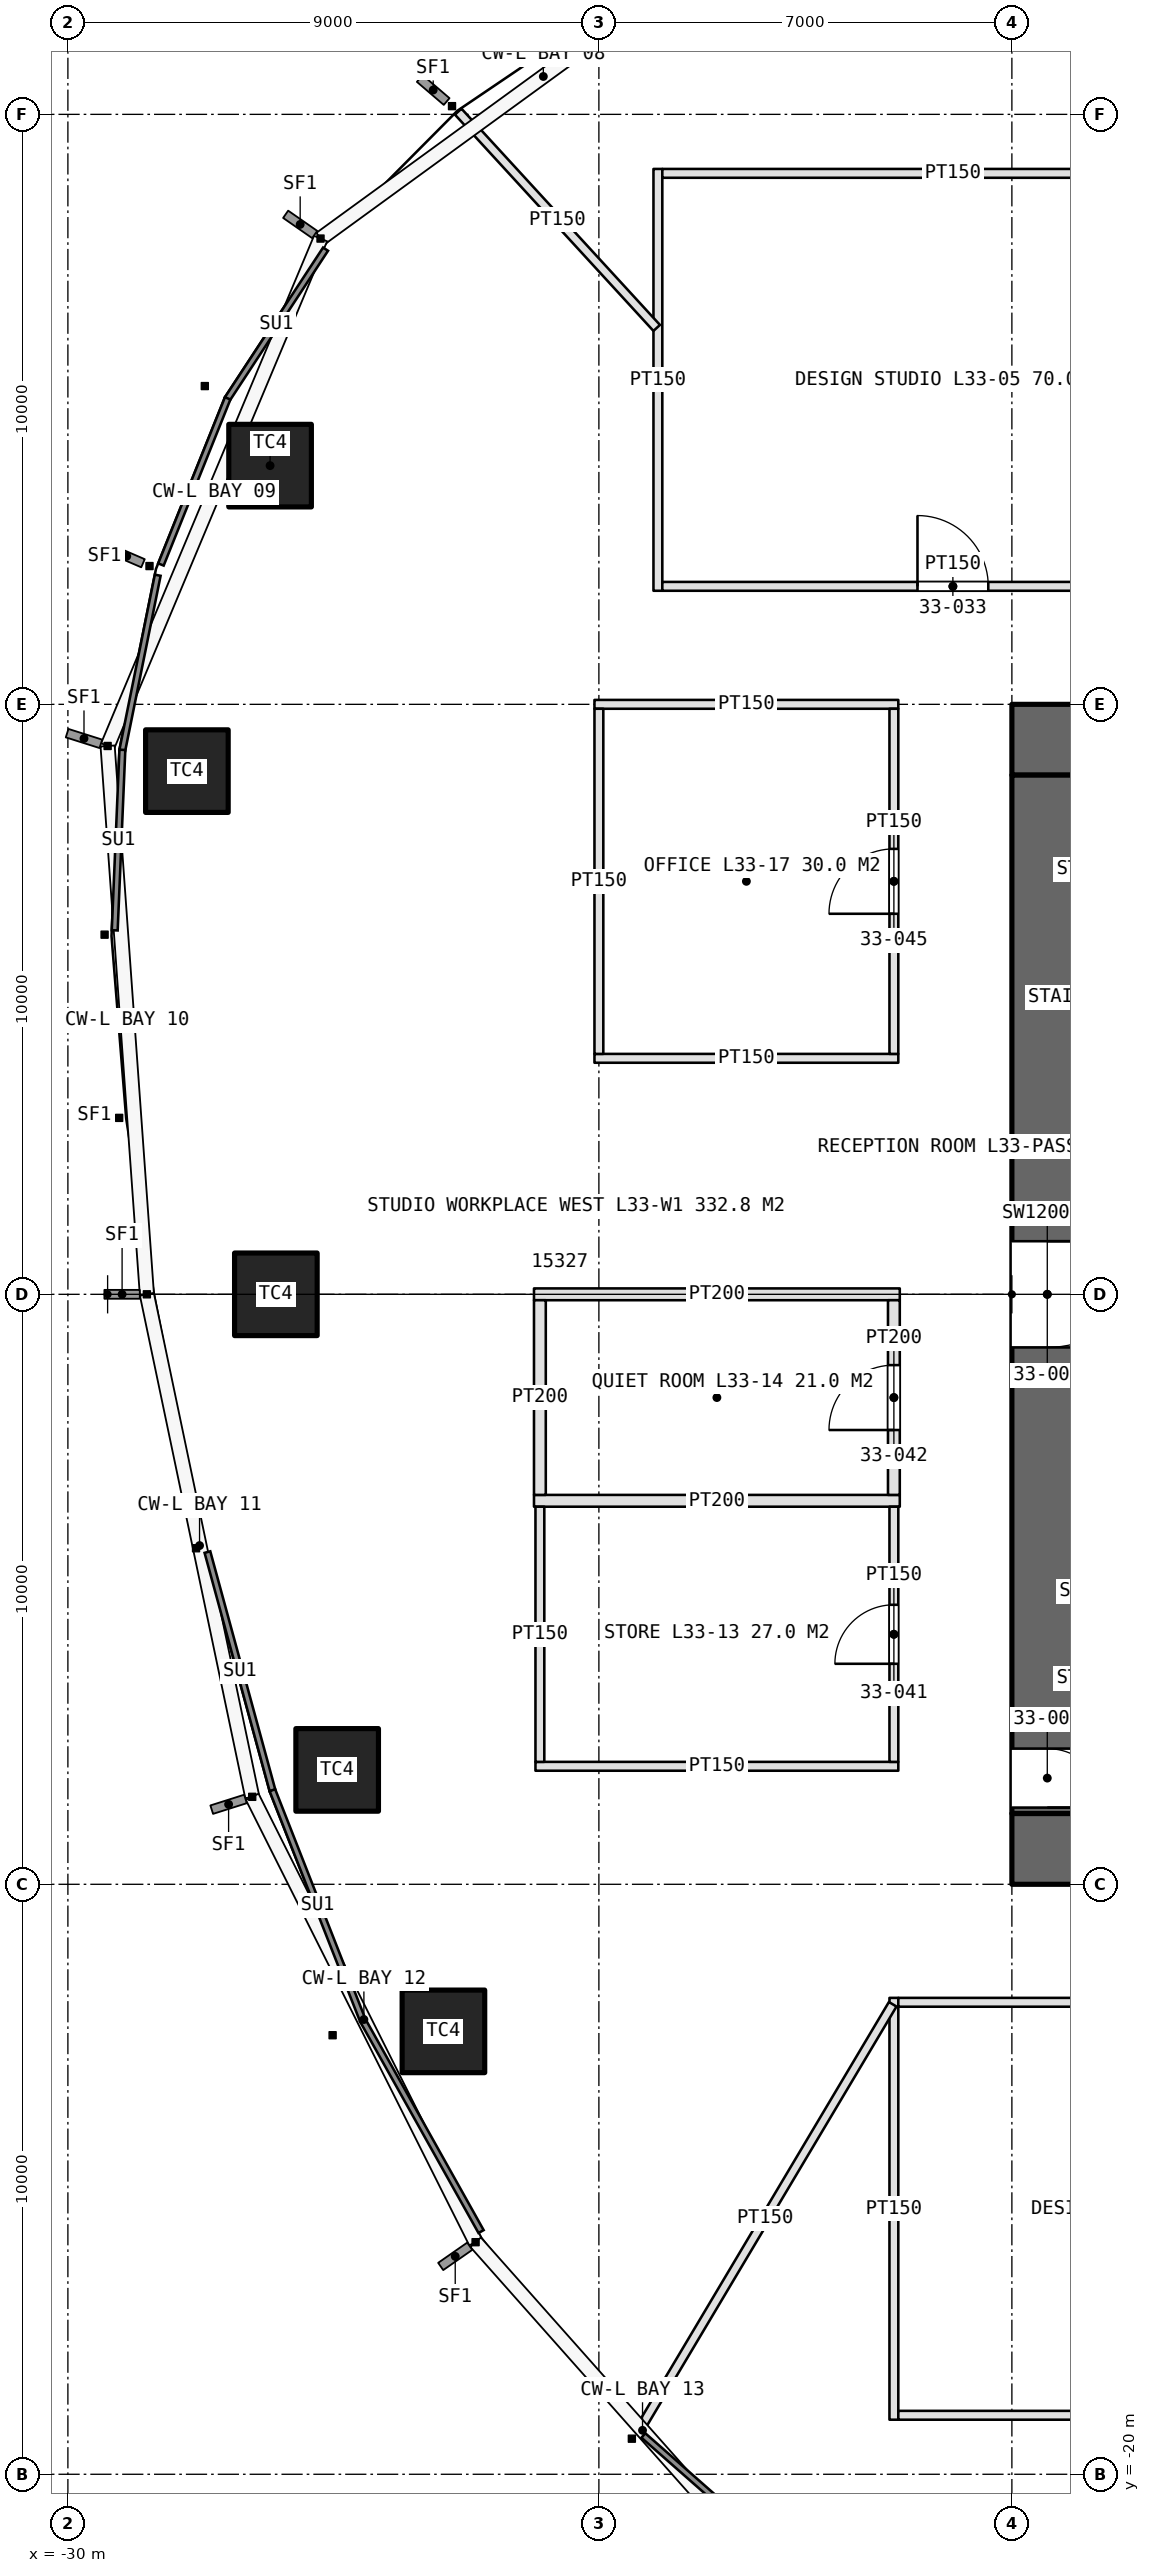
"""IFC4 building model, lengths in metres.
Left out: names, types, materials, properties, quantities, classifications, styles, units other than length and angle.
Written with IfcOpenShell. Run it as: python <this file> out.ifc"""

import sys

from ifc_helpers import new_model, si_unit, direction, frame, frame_2d, origin, origin_2d, place, context, subcontext, project, spatial, rectangle, extrude, element, fill, save


model = new_model("IFC4")
c1 = context("Model", 3, precision=1e-05, world=origin(), true_north=direction((0.0, 1.0)))
c2 = subcontext(c1, "Body", "Model", "MODEL_VIEW")
j1 = project(units=[si_unit("LENGTHUNIT", "METRE"), si_unit("PLANEANGLEUNIT", "RADIAN")], contexts=[c1])
p1 = place(None, origin())
s1 = spatial("IfcSite", under=j1, at=p1, CompositionType="ELEMENT")
p2 = place(p1, origin())
s2 = spatial("IfcBuilding", under=s1, at=p2, CompositionType="ELEMENT")
p3 = place(p2, frame((0.0, 0.0, 155.4)))
s3 = spatial("IfcBuildingStorey", under=s2, at=p3, CompositionType="ELEMENT", Elevation=155.4)
p4 = place(p3, frame((-14.0, -9.4, 0.0), z_axis=(0.0, 0.0, 1.0), x_axis=(1.0, 0.0, 0.0)))
e1 = element("IfcWall", 1, at=p4, inside=s3, PredefinedType="SHEAR", context=c2, shape_type="SweptSolid", body=[
    extrude(rectangle(XDim=28.0, YDim=1.2, at=frame_2d((14.0, 0.0))), origin(), (0.0, 0.0, 1.0), 4.2),
])
p5 = place(p4, frame((13.1, 0.0, 0.0)))
e2 = element("IfcOpeningElement", 2, at=p5, cuts=e1, PredefinedType="OPENING", context=c2, shape_type="SweptSolid", body=[
    extrude(rectangle(XDim=1.8, YDim=2.4, at=frame_2d((0.9, 1.2))), frame((0.0, 0.61, 0.0), z_axis=(0.0, -1.0, 0.0), x_axis=(1.0, 0.0, 0.0)), (0.0, 0.0, 1.0), 1.22),
])
p6 = place(p4, frame((22.9, 0.0, 0.0)))
e3 = element("IfcOpeningElement", 3, at=p6, cuts=e1, PredefinedType="OPENING", context=c2, shape_type="SweptSolid", body=[
    extrude(rectangle(XDim=2.2, YDim=2.7, at=frame_2d((1.1, 1.35))), frame((0.0, 0.61, 0.0), z_axis=(0.0, -1.0, 0.0), x_axis=(1.0, 0.0, 0.0)), (0.0, 0.0, 1.0), 1.22),
])
p7 = place(p3, frame((14.0, 9.4, 0.0), z_axis=(0.0, 0.0, 1.0), x_axis=(-1.0, 0.0, 0.0)))
e4 = element("IfcWall", 4, at=p7, inside=s3, PredefinedType="SHEAR", context=c2, shape_type="SweptSolid", body=[
    extrude(rectangle(XDim=28.0, YDim=1.2, at=frame_2d((14.0, 0.0))), origin(), (0.0, 0.0, 1.0), 4.2),
])
p8 = place(p7, frame((24.0, 0.0, 0.0)))
e5 = element("IfcOpeningElement", 5, at=p8, cuts=e4, PredefinedType="OPENING", context=c2, shape_type="SweptSolid", body=[
    extrude(rectangle(XDim=1.0, YDim=2.4, at=frame_2d((0.5, 1.2))), frame((0.0, 0.61, 0.0), z_axis=(0.0, -1.0, 0.0), x_axis=(1.0, 0.0, 0.0)), (0.0, 0.0, 1.0), 1.22),
])
p9 = place(p7, frame((13.1, 0.0, 0.0)))
e6 = element("IfcOpeningElement", 6, at=p9, cuts=e4, PredefinedType="OPENING", context=c2, shape_type="SweptSolid", body=[
    extrude(rectangle(XDim=1.8, YDim=2.4, at=frame_2d((0.9, 1.2))), frame((0.0, 0.61, 0.0), z_axis=(0.0, -1.0, 0.0), x_axis=(1.0, 0.0, 0.0)), (0.0, 0.0, 1.0), 1.22),
])
p10 = place(p3, frame((-13.4, 8.8, 0.0), z_axis=(0.0, 0.0, 1.0), x_axis=(0.0, -1.0, 0.0)))
e7 = element("IfcWall", 7, at=p10, inside=s3, PredefinedType="SHEAR", context=c2, shape_type="SweptSolid", body=[
    extrude(rectangle(XDim=17.6, YDim=1.2, at=frame_2d((8.8, 0.0))), origin(), (0.0, 0.0, 1.0), 4.2),
])
p11 = place(p10, frame((7.9, 0.0, 0.0)))
e8 = element("IfcOpeningElement", 8, at=p11, cuts=e7, PredefinedType="OPENING", context=c2, shape_type="SweptSolid", body=[
    extrude(rectangle(XDim=1.8, YDim=2.4, at=frame_2d((0.9, 1.2))), frame((0.0, 0.61, 0.0), z_axis=(0.0, -1.0, 0.0), x_axis=(1.0, 0.0, 0.0)), (0.0, 0.0, 1.0), 1.22),
])
p12 = place(p10, frame((16.5, 0.0, 0.0)))
e9 = element("IfcOpeningElement", 9, at=p12, cuts=e7, PredefinedType="OPENING", context=c2, shape_type="SweptSolid", body=[
    extrude(rectangle(XDim=1.0, YDim=2.4, at=frame_2d((0.5, 1.2))), frame((0.0, 0.61, 0.0), z_axis=(0.0, -1.0, 0.0), x_axis=(1.0, 0.0, 0.0)), (0.0, 0.0, 1.0), 1.22),
])
for number, where, z_axis, x_axis in (
    (10, (-26.573, 14.046, 0.0), (0.0, 0.0, 1.0), (1.0, 0.0, 0.0)),
    (11, (-27.983, 8.868, 0.0), (0.0, 0.0, 1.0), (1.0, 0.0, 0.0)),
    (12, (-26.475, 0.0, 0.0), (0.0, 0.0, 1.0), (1.0, 0.0, 0.0)),
    (13, (-25.436, -8.061, 0.0), (0.0, 0.0, 1.0), (1.0, 0.0, 0.0)),
    (14, (-23.635, -12.493, 0.0), (0.0, 0.0, 1.0), (1.0, 0.0, 0.0)),
):
    element("IfcColumn", number, at=place(p3, frame(where, z_axis=z_axis, x_axis=x_axis)), inside=s3, PredefinedType="COLUMN", context=c2, shape_type="SweptSolid", body=[
        extrude(rectangle(XDim=1.4, YDim=1.4, at=origin_2d()), origin(), (0.0, 0.0, 1.0), 4.2),
    ])
p13 = place(p3, frame((-16.0, -11.925, 0.0), z_axis=(0.0, 0.0, 1.0), x_axis=(0.0, -1.0, 0.0)))
e15 = element("IfcWall", 15, at=p13, inside=s3, PredefinedType="PARTITIONING", context=c2, shape_type="SweptSolid", body=[
    extrude(rectangle(XDim=7.15, YDim=0.15, at=frame_2d((3.575, 0.0))), origin(), (0.0, 0.0, 1.0), 3.0),
])
p14 = place(p3, frame((-15.925, -12.0, 0.0), z_axis=(0.0, 0.0, 1.0), x_axis=(1.0, 0.0, 0.0)))
e16 = element("IfcWall", 16, at=p14, inside=s3, PredefinedType="PARTITIONING", context=c2, shape_type="SweptSolid", body=[
    extrude(rectangle(XDim=9.85, YDim=0.15, at=frame_2d((4.925, 0.0))), origin(), (0.0, 0.0, 1.0), 3.0),
])
p15 = place(p14, frame((4.325, 0.0, 0.0)))
e17 = element("IfcOpeningElement", 17, at=p15, cuts=e16, PredefinedType="OPENING", context=c2, shape_type="SweptSolid", body=[
    extrude(rectangle(XDim=1.2, YDim=2.4, at=frame_2d((0.6, 1.2))), frame((0.0, 0.085, 0.0), z_axis=(0.0, -1.0, 0.0), x_axis=(1.0, 0.0, 0.0)), (0.0, 0.0, 1.0), 0.17),
])
p16 = place(p3, frame((-15.925, -19.0, 0.0), z_axis=(0.0, 0.0, 1.0), x_axis=(1.0, 0.0, 0.0)))
e18 = element("IfcWall", 18, at=p16, inside=s3, PredefinedType="PARTITIONING", context=c2, shape_type="SweptSolid", body=[
    extrude(rectangle(XDim=9.85, YDim=0.15, at=frame_2d((4.925, 0.0))), origin(), (0.0, 0.0, 1.0), 3.0),
])
p17 = place(p3, frame((-20.0, 11.925, 0.0), z_axis=(0.0, 0.0, 1.0), x_axis=(0.0, 1.0, 0.0)))
e19 = element("IfcWall", 19, at=p17, inside=s3, PredefinedType="PARTITIONING", context=c2, shape_type="SweptSolid", body=[
    extrude(rectangle(XDim=7.15, YDim=0.15, at=frame_2d((3.575, 0.0))), origin(), (0.0, 0.0, 1.0), 3.0),
])
p18 = place(p3, frame((-19.925, 12.0, 0.0), z_axis=(0.0, 0.0, 1.0), x_axis=(1.0, 0.0, 0.0)))
e20 = element("IfcWall", 20, at=p18, inside=s3, PredefinedType="PARTITIONING", context=c2, shape_type="SweptSolid", body=[
    extrude(rectangle(XDim=9.85, YDim=0.15, at=frame_2d((4.925, 0.0))), origin(), (0.0, 0.0, 1.0), 3.0),
])
p19 = place(p18, frame((4.325, 0.0, 0.0)))
e21 = element("IfcOpeningElement", 21, at=p19, cuts=e20, PredefinedType="OPENING", context=c2, shape_type="SweptSolid", body=[
    extrude(rectangle(XDim=1.2, YDim=2.4, at=frame_2d((0.6, 1.2))), frame((0.0, 0.085, 0.0), z_axis=(0.0, -1.0, 0.0), x_axis=(1.0, 0.0, 0.0)), (0.0, 0.0, 1.0), 0.17),
])
p20 = place(p3, frame((-19.925, 19.0, 0.0), z_axis=(0.0, 0.0, 1.0), x_axis=(1.0, 0.0, 0.0)))
e22 = element("IfcWall", 22, at=p20, inside=s3, PredefinedType="PARTITIONING", context=c2, shape_type="SweptSolid", body=[
    extrude(rectangle(XDim=9.85, YDim=0.15, at=frame_2d((4.925, 0.0))), origin(), (0.0, 0.0, 1.0), 3.0),
])
p21 = place(p3, frame((-15.925, -8.0, 0.0), z_axis=(0.0, 0.0, 1.0), x_axis=(-1.0, 0.0, 0.0)))
e23 = element("IfcWall", 23, at=p21, inside=s3, PredefinedType="PARTITIONING", context=c2, shape_type="SweptSolid", body=[
    extrude(rectangle(XDim=6.15, YDim=0.15, at=frame_2d((3.075, 0.0))), origin(), (0.0, 0.0, 1.0), 3.0),
])
for number, where, z_axis, x_axis in (
    (24, (-15.9, -3.5, 0.0), (0.0, 0.0, 1.0), (-1.0, 0.0, 0.0)),
    (25, (-15.9, 0.0, 0.0), (0.0, 0.0, 1.0), (-1.0, 0.0, 0.0)),
):
    element("IfcWall", number, at=place(p3, frame(where, z_axis=z_axis, x_axis=x_axis)), inside=s3, PredefinedType="PARTITIONING", context=c2, shape_type="SweptSolid", body=[
        extrude(rectangle(XDim=6.2, YDim=0.2, at=frame_2d((3.1, 0.0))), origin(), (0.0, 0.0, 1.0), 3.0),
    ])
p22 = place(p3, frame((-16.0, -7.925, 0.0), z_axis=(0.0, 0.0, 1.0), x_axis=(0.0, 1.0, 0.0)))
e26 = element("IfcWall", 26, at=p22, inside=s3, PredefinedType="PARTITIONING", context=c2, shape_type="SweptSolid", body=[
    extrude(rectangle(XDim=4.325, YDim=0.15, at=frame_2d((2.163, 0.0))), origin(), (0.0, 0.0, 1.0), 3.0),
])
p23 = place(p22, frame((1.663, 0.0, 0.0)))
e27 = element("IfcOpeningElement", 27, at=p23, cuts=e26, PredefinedType="OPENING", context=c2, shape_type="SweptSolid", body=[
    extrude(rectangle(XDim=1.0, YDim=2.2, at=frame_2d((0.5, 1.1))), frame((0.0, 0.085, 0.0), z_axis=(0.0, -1.0, 0.0), x_axis=(1.0, 0.0, 0.0)), (0.0, 0.0, 1.0), 0.17),
])
p24 = place(p3, frame((-22.0, -7.925, 0.0), z_axis=(0.0, 0.0, 1.0), x_axis=(0.0, 1.0, 0.0)))
e28 = element("IfcWall", 28, at=p24, inside=s3, PredefinedType="PARTITIONING", context=c2, shape_type="SweptSolid", body=[
    extrude(rectangle(XDim=4.325, YDim=0.15, at=frame_2d((2.163, 0.0))), origin(), (0.0, 0.0, 1.0), 3.0),
])
p25 = place(p3, frame((-16.0, -3.4, 0.0), z_axis=(0.0, 0.0, 1.0), x_axis=(0.0, 1.0, 0.0)))
e29 = element("IfcWall", 29, at=p25, inside=s3, PredefinedType="PARTITIONING", context=c2, shape_type="SweptSolid", body=[
    extrude(rectangle(XDim=3.3, YDim=0.2, at=frame_2d((1.65, 0.0))), origin(), (0.0, 0.0, 1.0), 3.0),
])
p26 = place(p25, frame((1.1, 0.0, 0.0)))
e30 = element("IfcOpeningElement", 30, at=p26, cuts=e29, PredefinedType="OPENING", context=c2, shape_type="SweptSolid", body=[
    extrude(rectangle(XDim=1.1, YDim=2.3, at=frame_2d((0.55, 1.15))), frame((0.0, 0.11, 0.0), z_axis=(0.0, -1.0, 0.0), x_axis=(1.0, 0.0, 0.0)), (0.0, 0.0, 1.0), 0.22),
])
p27 = place(p3, frame((-22.0, -3.4, 0.0), z_axis=(0.0, 0.0, 1.0), x_axis=(0.0, 1.0, 0.0)))
e31 = element("IfcWall", 31, at=p27, inside=s3, PredefinedType="PARTITIONING", context=c2, shape_type="SweptSolid", body=[
    extrude(rectangle(XDim=3.3, YDim=0.2, at=frame_2d((1.65, 0.0))), origin(), (0.0, 0.0, 1.0), 3.0),
])
for number, where, z_axis, x_axis in (
    (32, (-15.925, 4.0, 0.0), (0.0, 0.0, 1.0), (-1.0, 0.0, 0.0)),
    (33, (-15.925, 10.0, 0.0), (0.0, 0.0, 1.0), (-1.0, 0.0, 0.0)),
):
    element("IfcWall", number, at=place(p3, frame(where, z_axis=z_axis, x_axis=x_axis)), inside=s3, PredefinedType="PARTITIONING", context=c2, shape_type="SweptSolid", body=[
        extrude(rectangle(XDim=5.15, YDim=0.15, at=frame_2d((2.575, 0.0))), origin(), (0.0, 0.0, 1.0), 3.0),
    ])
p28 = place(p3, frame((-16.0, 4.075, 0.0), z_axis=(0.0, 0.0, 1.0), x_axis=(0.0, 1.0, 0.0)))
e34 = element("IfcWall", 34, at=p28, inside=s3, PredefinedType="PARTITIONING", context=c2, shape_type="SweptSolid", body=[
    extrude(rectangle(XDim=5.85, YDim=0.15, at=frame_2d((2.925, 0.0))), origin(), (0.0, 0.0, 1.0), 3.0),
])
p29 = place(p28, frame((2.375, 0.0, 0.0)))
e35 = element("IfcOpeningElement", 35, at=p29, cuts=e34, PredefinedType="OPENING", context=c2, shape_type="SweptSolid", body=[
    extrude(rectangle(XDim=1.1, YDim=2.3, at=frame_2d((0.55, 1.15))), frame((0.0, 0.085, 0.0), z_axis=(0.0, -1.0, 0.0), x_axis=(1.0, 0.0, 0.0)), (0.0, 0.0, 1.0), 0.17),
])
p30 = place(p3, frame((-21.0, 4.075, 0.0), z_axis=(0.0, 0.0, 1.0), x_axis=(0.0, 1.0, 0.0)))
e36 = element("IfcWall", 36, at=p30, inside=s3, PredefinedType="PARTITIONING", context=c2, shape_type="SweptSolid", body=[
    extrude(rectangle(XDim=5.85, YDim=0.15, at=frame_2d((2.925, 0.0))), origin(), (0.0, 0.0, 1.0), 3.0),
])
p31 = place(p3, frame((-16.02, -12.034, 0.0), z_axis=(0.0, 0.0, 1.0), x_axis=(-0.511518902153, -0.859272024879, 0.0)))
e37 = element("IfcWall", 37, at=p31, inside=s3, PredefinedType="PARTITIONING", context=c2, shape_type="SweptSolid", body=[
    extrude(rectangle(XDim=8.451, YDim=0.15, at=frame_2d((4.226, 0.0))), origin(), (0.0, 0.0, 1.0), 3.0),
])
p32 = place(p3, frame((-20.02, 16.38, 0.0), z_axis=(0.0, 0.0, 1.0), x_axis=(-0.676159982548, 0.736754828963, 0.0)))
e38 = element("IfcWall", 38, at=p32, inside=s3, PredefinedType="PARTITIONING", context=c2, shape_type="SweptSolid", body=[
    extrude(rectangle(XDim=4.976, YDim=0.15, at=frame_2d((2.488, 0.0))), origin(), (0.0, 0.0, 1.0), 3.0),
])
p33 = place(p11, origin())
e39 = element("IfcDoor", 39, at=p33, inside=s3, OperationType="DOUBLE_DOOR_SINGLE_SWING", PredefinedType="DOOR", context=c2, shape_type="SweptSolid", body=[
    extrude(rectangle(XDim=1.8, YDim=2.4, at=frame_2d((0.9, 1.2))), frame((0.0, 0.025, 0.0), z_axis=(0.0, -1.0, 0.0), x_axis=(1.0, 0.0, 0.0)), (0.0, 0.0, 1.0), 0.05),
])
fill(e8, e39)
p34 = place(p12, origin())
e40 = element("IfcDoor", 40, at=p34, inside=s3, OperationType="SINGLE_SWING_RIGHT", PredefinedType="DOOR", context=c2, shape_type="SweptSolid", body=[
    extrude(rectangle(XDim=1.0, YDim=2.4, at=frame_2d((0.5, 1.2))), frame((0.0, 0.025, 0.0), z_axis=(0.0, -1.0, 0.0), x_axis=(1.0, 0.0, 0.0)), (0.0, 0.0, 1.0), 0.05),
])
fill(e9, e40)
p35 = place(p19, origin())
e41 = element("IfcDoor", 41, at=p35, inside=s3, OperationType="SINGLE_SWING_LEFT", PredefinedType="DOOR", context=c2, shape_type="SweptSolid", body=[
    extrude(rectangle(XDim=1.2, YDim=2.4, at=frame_2d((0.6, 1.2))), frame((0.0, 0.025, 0.0), z_axis=(0.0, -1.0, 0.0), x_axis=(1.0, 0.0, 0.0)), (0.0, 0.0, 1.0), 0.05),
])
fill(e21, e41)
p36 = place(p23, origin())
e42 = element("IfcDoor", 42, at=p36, inside=s3, OperationType="SINGLE_SWING_LEFT", PredefinedType="DOOR", context=c2, shape_type="SweptSolid", body=[
    extrude(rectangle(XDim=1.0, YDim=2.2, at=frame_2d((0.5, 1.1))), frame((0.0, 0.025, 0.0), z_axis=(0.0, -1.0, 0.0), x_axis=(1.0, 0.0, 0.0)), (0.0, 0.0, 1.0), 0.05),
])
fill(e27, e42)
p37 = place(p26, origin())
e43 = element("IfcDoor", 43, at=p37, inside=s3, OperationType="SINGLE_SWING_LEFT", PredefinedType="DOOR", context=c2, shape_type="SweptSolid", body=[
    extrude(rectangle(XDim=1.1, YDim=2.3, at=frame_2d((0.55, 1.15))), frame((0.0, 0.025, 0.0), z_axis=(0.0, -1.0, 0.0), x_axis=(1.0, 0.0, 0.0)), (0.0, 0.0, 1.0), 0.05),
])
fill(e30, e43)
p38 = place(p29, origin())
e44 = element("IfcDoor", 44, at=p38, inside=s3, OperationType="SINGLE_SWING_LEFT", PredefinedType="DOOR", context=c2, shape_type="SweptSolid", body=[
    extrude(rectangle(XDim=1.1, YDim=2.3, at=frame_2d((0.55, 1.15))), frame((0.0, 0.025, 0.0), z_axis=(0.0, -1.0, 0.0), x_axis=(1.0, 0.0, 0.0)), (0.0, 0.0, 1.0), 0.05),
])
fill(e35, e44)
save(model, sys.argv[1])
